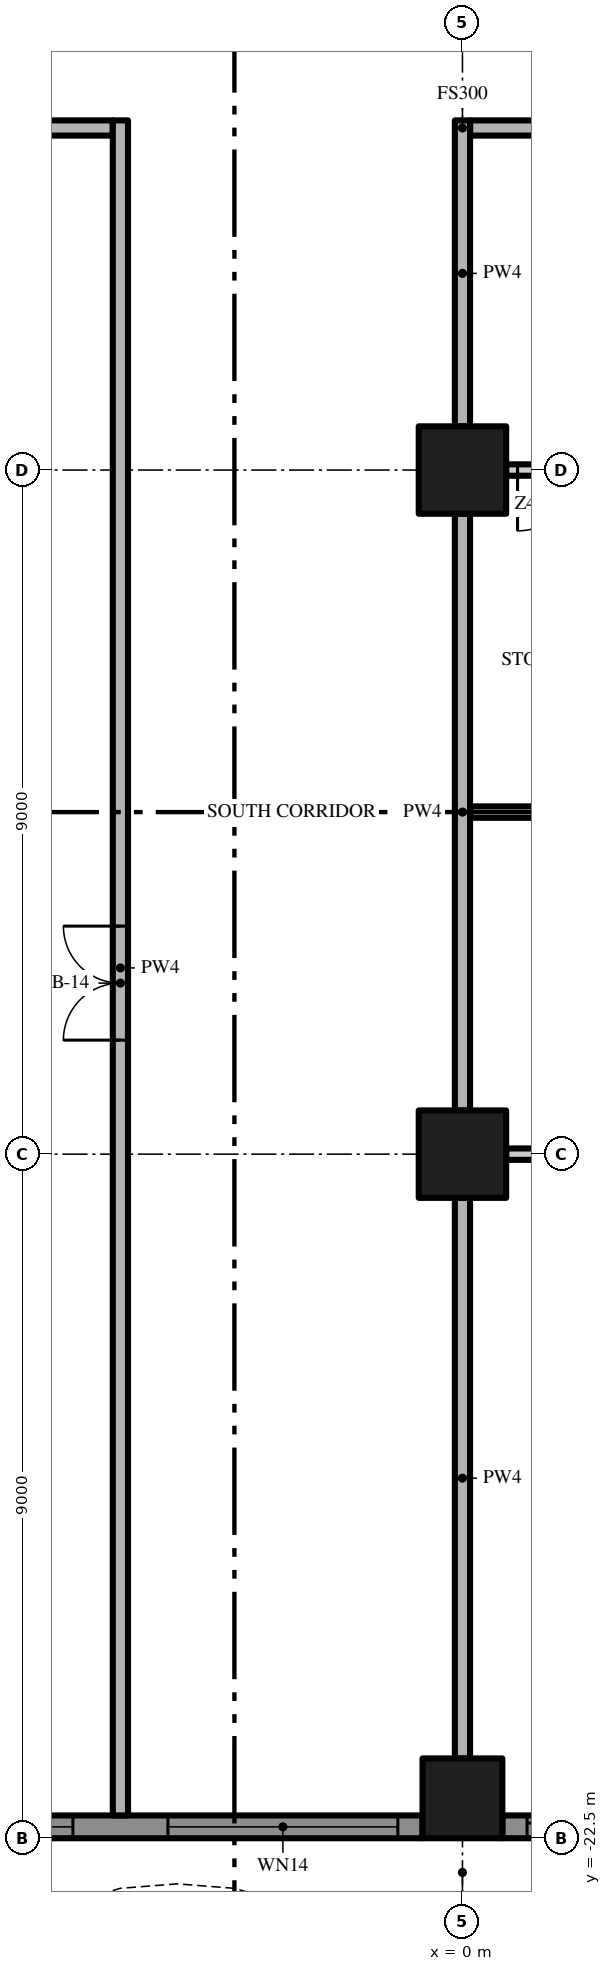
"""IFC4 building model, lengths in metres.
Left out: names, types, materials, properties, quantities, classifications, styles, units other than length and angle.
Written with IfcOpenShell. Run it as: python <this file> out.ifc"""

import sys

from ifc_helpers import new_model, si_unit, direction, frame, frame_2d, origin, origin_2d, place, context, subcontext, project, spatial, polyline, rectangle, outline, extrude, element, fill, save


model = new_model("IFC4")
c1 = context("Model", 3, precision=1e-05, world=origin(), true_north=direction((0.0, 1.0)))
c2 = subcontext(c1, "Body", "Model", "MODEL_VIEW")
j1 = project(units=[si_unit("LENGTHUNIT", "METRE"), si_unit("PLANEANGLEUNIT", "RADIAN")], contexts=[c1])
p1 = place(None, origin())
s1 = spatial("IfcSite", under=j1, at=p1, CompositionType="ELEMENT")
p2 = place(p1, origin())
s2 = spatial("IfcBuilding", under=s1, at=p2, CompositionType="ELEMENT")
p3 = place(p2, frame((0.0, 0.0, 195.8)))
s3 = spatial("IfcBuildingStorey", under=s2, at=p3, CompositionType="ELEMENT", Elevation=195.8)
p4 = place(p3, frame((0.0, -13.5, 0.0), z_axis=(0.0, 0.0, 1.0), x_axis=(1.0, 0.0, 0.0)))
e1 = element("IfcColumn", 1, at=p4, inside=s3, PredefinedType="COLUMN", context=c2, shape_type="SweptSolid", body=[
    extrude(rectangle(XDim=1.15, YDim=1.15, at=origin_2d()), origin(), (0.0, 0.0, 1.0), 3.5),
])
p5 = place(p3, frame((0.0, -21.975, 0.0), z_axis=(0.0, 0.0, 1.0), x_axis=(1.0, 0.0, 0.0)))
e2 = element("IfcColumn", 2, at=p5, inside=s3, PredefinedType="COLUMN", context=c2, shape_type="SweptSolid", body=[
    extrude(rectangle(XDim=1.05, YDim=1.05, at=origin_2d()), origin(), (0.0, 0.0, 1.0), 3.5),
])
p6 = place(p3, frame((0.0, -4.5, 0.0), z_axis=(0.0, 0.0, 1.0), x_axis=(1.0, 0.0, 0.0)))
e3 = element("IfcColumn", 3, at=p6, inside=s3, PredefinedType="COLUMN", context=c2, shape_type="SweptSolid", body=[
    extrude(rectangle(XDim=1.15, YDim=1.15, at=origin_2d()), origin(), (0.0, 0.0, 1.0), 3.5),
])
p7 = place(p3, frame((-0.525, -22.35, 0.0), z_axis=(0.0, 0.0, 1.0), x_axis=(-1.0, 0.0, 0.0)))
e4 = element("IfcWall", 4, at=p7, inside=s3, PredefinedType="SOLIDWALL", context=c2, shape_type="SweptSolid", body=[
    extrude(rectangle(XDim=7.95, YDim=0.3, at=frame_2d((3.975, 0.0))), origin(), (0.0, 0.0, 1.0), 3.5),
])
p8 = place(p7, frame((4.6, 0.0, 0.45)))
e5 = element("IfcOpeningElement", 5, at=p8, cuts=e4, PredefinedType="OPENING", context=c2, shape_type="SweptSolid", body=[
    extrude(rectangle(XDim=3.025, YDim=2.65, at=frame_2d((1.512, 1.325))), frame((0.0, 0.16, 0.0), z_axis=(0.0, -1.0, 0.0), x_axis=(1.0, 0.0, 0.0)), (0.0, 0.0, 1.0), 0.32),
])
p9 = place(p7, frame((0.325, 0.0, 0.45)))
e6 = element("IfcOpeningElement", 6, at=p9, cuts=e4, PredefinedType="OPENING", context=c2, shape_type="SweptSolid", body=[
    extrude(rectangle(XDim=3.025, YDim=2.65, at=frame_2d((1.512, 1.325))), frame((0.0, 0.16, 0.0), z_axis=(0.0, -1.0, 0.0), x_axis=(1.0, 0.0, 0.0)), (0.0, 0.0, 1.0), 0.32),
])
p10 = place(p3, frame((8.475, -22.35, 0.0), z_axis=(0.0, 0.0, 1.0), x_axis=(-1.0, 0.0, 0.0)))
e7 = element("IfcWall", 7, at=p10, inside=s3, PredefinedType="SOLIDWALL", context=c2, shape_type="SweptSolid", body=[
    extrude(rectangle(XDim=7.95, YDim=0.3, at=frame_2d((3.975, 0.0))), origin(), (0.0, 0.0, 1.0), 3.5),
])
p11 = place(p10, frame((4.6, 0.0, 0.0)))
e8 = element("IfcOpeningElement", 8, at=p11, cuts=e7, PredefinedType="OPENING", context=c2, shape_type="SweptSolid", body=[
    extrude(rectangle(XDim=3.025, YDim=2.4, at=frame_2d((1.512, 1.2))), frame((0.0, 0.16, 0.0), z_axis=(0.0, -1.0, 0.0), x_axis=(1.0, 0.0, 0.0)), (0.0, 0.0, 1.0), 0.32),
])
p12 = place(p10, frame((0.325, 0.0, 0.45)))
e9 = element("IfcOpeningElement", 9, at=p12, cuts=e7, PredefinedType="OPENING", context=c2, shape_type="SweptSolid", body=[
    extrude(rectangle(XDim=3.025, YDim=2.65, at=frame_2d((1.512, 1.325))), frame((0.0, 0.16, 0.0), z_axis=(0.0, -1.0, 0.0), x_axis=(1.0, 0.0, 0.0)), (0.0, 0.0, 1.0), 0.32),
])
p13 = place(p3, origin())
e10 = element("IfcWall", 10, at=p13, inside=s3, PredefinedType="USERDEFINED", context=c2, shape_type="SweptSolid", body=[
    extrude(outline(polyline([(-22.5, -24.3), (-21.0, -23.595), (-19.5, -23.159), (-18.75, -23.1), (-18.0, -23.159), (-16.5, -23.595), (-15.0, -24.3), (-13.5, -25.005), (-12.0, -25.441), (-11.25, -25.5), (-10.5, -25.441), (-9.0, -25.005), (-7.5, -24.3), (-6.0, -23.595), (-4.5, -23.159), (-3.75, -23.1), (-3.0, -23.159), (-1.5, -23.595), (0.0, -24.3), (1.5, -25.005), (3.0, -25.441), (3.75, -25.5), (4.5, -25.441), (6.0, -25.005), (7.5, -24.3), (9.0, -23.595), (10.5, -23.159), (11.25, -23.1), (12.0, -23.159), (13.5, -23.595), (15.0, -24.3), (16.5, -25.005), (18.0, -25.441), (18.75, -25.5), (19.5, -25.441), (21.0, -25.005), (22.5, -24.3), (22.394, -24.074), (20.911, -24.771), (19.455, -25.194), (18.75, -25.249), (18.045, -25.194), (16.589, -24.771), (15.106, -24.074), (13.589, -23.36), (12.045, -22.911), (11.25, -22.849), (10.455, -22.911), (8.911, -23.36), (7.394, -24.074), (5.911, -24.771), (4.455, -25.194), (3.75, -25.249), (3.045, -25.194), (1.589, -24.771), (0.106, -24.074), (-1.411, -23.36), (-2.955, -22.911), (-3.75, -22.849), (-4.545, -22.911), (-6.089, -23.36), (-7.606, -24.074), (-9.089, -24.771), (-10.545, -25.194), (-11.25, -25.249), (-11.955, -25.194), (-13.411, -24.771), (-14.894, -24.074), (-16.411, -23.36), (-17.955, -22.911), (-18.75, -22.849), (-19.545, -22.911), (-21.089, -23.36), (-22.606, -24.074), (-22.5, -24.3)])), origin(), (0.0, 0.0, 1.0), 0.9),
])
p14 = place(p3, frame((8.425, -13.5, 0.0), z_axis=(0.0, 0.0, 1.0), x_axis=(-1.0, 0.0, 0.0)))
e11 = element("IfcWall", 11, at=p14, inside=s3, PredefinedType="PARTITIONING", context=c2, shape_type="SweptSolid", body=[
    extrude(rectangle(XDim=7.85, YDim=0.15, at=frame_2d((3.925, 0.0))), origin(), (0.0, 0.0, 1.0), 3.5),
])
p15 = place(p14, frame((4.15, 0.0, 0.0)))
e12 = element("IfcOpeningElement", 12, at=p15, cuts=e11, PredefinedType="OPENING", context=c2, shape_type="SweptSolid", body=[
    extrude(rectangle(XDim=1.8, YDim=2.4, at=frame_2d((0.9, 1.2))), frame((0.0, 0.085, 0.0), z_axis=(0.0, -1.0, 0.0), x_axis=(1.0, 0.0, 0.0)), (0.0, 0.0, 1.0), 0.17),
])
p16 = place(p3, frame((0.1, -9.0, 0.0), z_axis=(0.0, 0.0, 1.0), x_axis=(1.0, 0.0, 0.0)))
e13 = element("IfcWall", 13, at=p16, inside=s3, PredefinedType="PARTITIONING", context=c2, shape_type="SweptSolid", body=[
    extrude(rectangle(XDim=13.4, YDim=0.15, at=frame_2d((6.7, 0.0))), origin(), (0.0, 0.0, 1.0), 3.5),
])
p17 = place(p16, frame((6.9, 0.0, 0.0)))
e14 = element("IfcOpeningElement", 14, at=p17, cuts=e13, PredefinedType="OPENING", context=c2, shape_type="SweptSolid", body=[
    extrude(rectangle(XDim=1.0, YDim=2.4, at=frame_2d((0.5, 1.2))), frame((0.0, 0.085, 0.0), z_axis=(0.0, -1.0, 0.0), x_axis=(1.0, 0.0, 0.0)), (0.0, 0.0, 1.0), 0.17),
])
p18 = place(p3, frame((8.425, -4.5, 0.0), z_axis=(0.0, 0.0, 1.0), x_axis=(-1.0, 0.0, 0.0)))
e15 = element("IfcWall", 15, at=p18, inside=s3, PredefinedType="PARTITIONING", context=c2, shape_type="SweptSolid", body=[
    extrude(rectangle(XDim=7.85, YDim=0.15, at=frame_2d((3.925, 0.0))), origin(), (0.0, 0.0, 1.0), 3.5),
])
p19 = place(p18, frame((6.9, 0.0, 0.0)))
e16 = element("IfcOpeningElement", 16, at=p19, cuts=e15, PredefinedType="OPENING", context=c2, shape_type="SweptSolid", body=[
    extrude(rectangle(XDim=0.8, YDim=2.0, at=frame_2d((0.4, 1.0))), frame((0.0, 0.085, 0.0), z_axis=(0.0, -1.0, 0.0), x_axis=(1.0, 0.0, 0.0)), (0.0, 0.0, 1.0), 0.17),
])
p20 = place(p18, frame((4.875, 0.0, 0.0)))
e17 = element("IfcOpeningElement", 17, at=p20, cuts=e15, PredefinedType="OPENING", context=c2, shape_type="SweptSolid", body=[
    extrude(rectangle(XDim=0.8, YDim=2.0, at=frame_2d((0.4, 1.0))), frame((0.0, 0.085, 0.0), z_axis=(0.0, -1.0, 0.0), x_axis=(1.0, 0.0, 0.0)), (0.0, 0.0, 1.0), 0.17),
])
p21 = place(p3, frame((-17.4, 0.0, 0.0), z_axis=(0.0, 0.0, 1.0), x_axis=(1.0, 0.0, 0.0)))
e18 = element("IfcWall", 18, at=p21, inside=s3, PredefinedType="PARTITIONING", context=c2, shape_type="SweptSolid", body=[
    extrude(rectangle(XDim=12.8, YDim=0.2, at=frame_2d((6.4, 0.0))), origin(), (0.0, 0.0, 1.0), 3.5),
])
p22 = place(p3, frame((17.4, 0.0, 0.0), z_axis=(0.0, 0.0, 1.0), x_axis=(-1.0, 0.0, 0.0)))
e19 = element("IfcWall", 19, at=p22, inside=s3, PredefinedType="PARTITIONING", context=c2, shape_type="SweptSolid", body=[
    extrude(rectangle(XDim=17.3, YDim=0.2, at=frame_2d((8.65, 0.0))), origin(), (0.0, 0.0, 1.0), 3.5),
])
p23 = place(p22, frame((7.65, 0.0, 0.0)))
e20 = element("IfcOpeningElement", 20, at=p23, cuts=e19, PredefinedType="OPENING", context=c2, shape_type="SweptSolid", body=[
    extrude(rectangle(XDim=1.5, YDim=2.4, at=frame_2d((0.75, 1.2))), frame((0.0, 0.11, 0.0), z_axis=(0.0, -1.0, 0.0), x_axis=(1.0, 0.0, 0.0)), (0.0, 0.0, 1.0), 0.22),
])
p24 = place(p3, frame((-4.5, -22.2, 0.0), z_axis=(0.0, 0.0, 1.0), x_axis=(0.0, 1.0, 0.0)))
e21 = element("IfcWall", 21, at=p24, inside=s3, PredefinedType="PARTITIONING", context=c2, shape_type="SweptSolid", body=[
    extrude(rectangle(XDim=22.3, YDim=0.2, at=frame_2d((11.15, 0.0))), origin(), (0.0, 0.0, 1.0), 3.5),
])
p25 = place(p24, frame((10.2, 0.0, 0.0)))
e22 = element("IfcOpeningElement", 22, at=p25, cuts=e21, PredefinedType="OPENING", context=c2, shape_type="SweptSolid", body=[
    extrude(rectangle(XDim=1.5, YDim=2.4, at=frame_2d((0.75, 1.2))), frame((0.0, 0.11, 0.0), z_axis=(0.0, -1.0, 0.0), x_axis=(1.0, 0.0, 0.0)), (0.0, 0.0, 1.0), 0.22),
])
p26 = place(p3, frame((0.0, -21.45, 0.0), z_axis=(0.0, 0.0, 1.0), x_axis=(0.0, 1.0, 0.0)))
e23 = element("IfcWall", 23, at=p26, inside=s3, PredefinedType="PARTITIONING", context=c2, shape_type="SweptSolid", body=[
    extrude(rectangle(XDim=7.375, YDim=0.2, at=frame_2d((3.688, 0.0))), origin(), (0.0, 0.0, 1.0), 3.5),
])
p27 = place(p3, frame((0.0, -12.925, 0.0), z_axis=(0.0, 0.0, 1.0), x_axis=(0.0, 1.0, 0.0)))
e24 = element("IfcWall", 24, at=p27, inside=s3, PredefinedType="PARTITIONING", context=c2, shape_type="SweptSolid", body=[
    extrude(rectangle(XDim=7.85, YDim=0.2, at=frame_2d((3.925, 0.0))), origin(), (0.0, 0.0, 1.0), 3.5),
])
p28 = place(p3, frame((0.0, -3.925, 0.0), z_axis=(0.0, 0.0, 1.0), x_axis=(0.0, 1.0, 0.0)))
e25 = element("IfcWall", 25, at=p28, inside=s3, PredefinedType="PARTITIONING", context=c2, shape_type="SweptSolid", body=[
    extrude(rectangle(XDim=4.025, YDim=0.2, at=frame_2d((2.013, 0.0))), origin(), (0.0, 0.0, 1.0), 3.5),
])
p29 = place(p8, origin())
e26 = element("IfcWindow", 26, at=p29, inside=s3, PartitioningType="SINGLE_PANEL", PredefinedType="WINDOW", context=c2, shape_type="SweptSolid", body=[
    extrude(rectangle(XDim=3.025, YDim=2.65, at=frame_2d((1.512, 1.325))), frame((0.0, 0.03, 0.0), z_axis=(0.0, -1.0, 0.0), x_axis=(1.0, 0.0, 0.0)), (0.0, 0.0, 1.0), 0.06),
])
fill(e5, e26)
p30 = place(p9, origin())
e27 = element("IfcWindow", 27, at=p30, inside=s3, PartitioningType="SINGLE_PANEL", PredefinedType="WINDOW", context=c2, shape_type="SweptSolid", body=[
    extrude(rectangle(XDim=3.025, YDim=2.65, at=frame_2d((1.512, 1.325))), frame((0.0, 0.03, 0.0), z_axis=(0.0, -1.0, 0.0), x_axis=(1.0, 0.0, 0.0)), (0.0, 0.0, 1.0), 0.06),
])
fill(e6, e27)
p31 = place(p11, origin())
e28 = element("IfcDoor", 28, at=p31, inside=s3, OperationType="SINGLE_SWING_LEFT", PredefinedType="DOOR", context=c2, shape_type="SweptSolid", body=[
    extrude(rectangle(XDim=3.025, YDim=2.4, at=frame_2d((1.512, 1.2))), frame((0.0, 0.025, 0.0), z_axis=(0.0, -1.0, 0.0), x_axis=(1.0, 0.0, 0.0)), (0.0, 0.0, 1.0), 0.05),
])
fill(e8, e28)
p32 = place(p25, origin())
e29 = element("IfcDoor", 29, at=p32, inside=s3, OperationType="DOUBLE_DOOR_SINGLE_SWING", PredefinedType="DOOR", context=c2, shape_type="SweptSolid", body=[
    extrude(rectangle(XDim=1.5, YDim=2.4, at=frame_2d((0.75, 1.2))), frame((0.0, 0.025, 0.0), z_axis=(0.0, -1.0, 0.0), x_axis=(1.0, 0.0, 0.0)), (0.0, 0.0, 1.0), 0.05),
])
fill(e22, e29)
p33 = place(p19, origin())
e30 = element("IfcDoor", 30, at=p33, inside=s3, OperationType="SINGLE_SWING_RIGHT", PredefinedType="DOOR", context=c2, shape_type="SweptSolid", body=[
    extrude(rectangle(XDim=0.8, YDim=2.0, at=frame_2d((0.4, 1.0))), frame((0.0, 0.025, 0.0), z_axis=(0.0, -1.0, 0.0), x_axis=(1.0, 0.0, 0.0)), (0.0, 0.0, 1.0), 0.05),
])
fill(e16, e30)
save(model, sys.argv[1])
